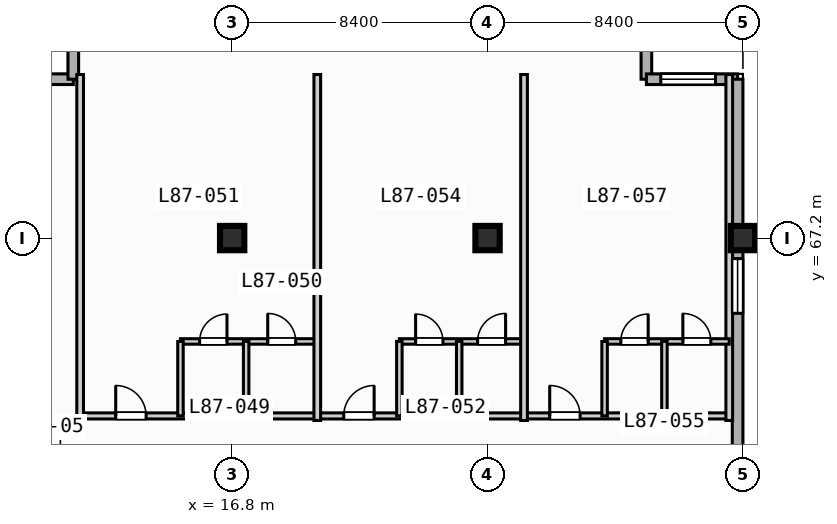
"""IFC4 building model, lengths in metres.
Left out: names, types, materials, properties, quantities, classifications, styles, units other than length and angle.
Written with IfcOpenShell. Run it as: python <this file> out.ifc"""

import sys

from ifc_helpers import new_model, si_unit, direction, frame, frame_2d, origin, origin_2d, place, context, subcontext, project, spatial, rectangle, extrude, element, fill, save


model = new_model("IFC4")
c1 = context("Model", 3, precision=1e-05, world=origin(), true_north=direction((0.0, 1.0)))
c2 = subcontext(c1, "Body", "Model", "MODEL_VIEW")
j1 = project(units=[si_unit("LENGTHUNIT", "METRE"), si_unit("PLANEANGLEUNIT", "RADIAN")], contexts=[c1])
p1 = place(None, origin())
s1 = spatial("IfcSite", under=j1, at=p1, CompositionType="ELEMENT")
p2 = place(p1, origin())
s2 = spatial("IfcBuilding", under=s1, at=p2, CompositionType="ELEMENT")
p3 = place(p2, frame((0.0, 0.0, 351.5)))
s3 = spatial("IfcBuildingStorey", under=s2, at=p3, CompositionType="ELEMENT", Elevation=351.5)
for number, where, z_axis, x_axis in (
    (1, (16.8, 67.2, 0.0), (0.0, 0.0, 1.0), (1.0, 0.0, 0.0)),
    (2, (25.2, 67.2, 0.0), (0.0, 0.0, 1.0), (1.0, 0.0, 0.0)),
    (3, (33.6, 67.2, 0.0), (0.0, 0.0, 1.0), (1.0, 0.0, 0.0)),
):
    element("IfcColumn", number, at=place(p3, frame(where, z_axis=z_axis, x_axis=x_axis)), inside=s3, PredefinedType="COLUMN", context=c2, shape_type="SweptSolid", body=[
        extrude(rectangle(XDim=0.8, YDim=0.8, at=origin_2d()), origin(), (0.0, 0.0, 1.0), 3.9),
    ])
for number, where, z_axis, x_axis in (
    (4, (8.575, 72.425, 0.0), (0.0, 0.0, 1.0), (1.0, 0.0, 0.0)),
    (5, (11.575, 72.425, 0.0), (0.0, 0.0, 1.0), (0.0, 1.0, 0.0)),
    (6, (30.425, 75.425, 0.0), (0.0, 0.0, 1.0), (0.0, -1.0, 0.0)),
):
    element("IfcWall", number, at=place(p3, frame(where, z_axis=z_axis, x_axis=x_axis)), inside=s3, PredefinedType="STANDARD", context=c2, shape_type="SweptSolid", body=[
        extrude(rectangle(XDim=3.0, YDim=0.35, at=frame_2d((1.5, 0.0))), origin(), (0.0, 0.0, 1.0), 3.67),
    ])
p4 = place(p3, frame((30.425, 72.425, 0.0), z_axis=(0.0, 0.0, 1.0), x_axis=(1.0, 0.0, 0.0)))
e7 = element("IfcWall", 7, at=p4, inside=s3, PredefinedType="STANDARD", context=c2, shape_type="SweptSolid", body=[
    extrude(rectangle(XDim=3.0, YDim=0.35, at=frame_2d((1.5, 0.0))), origin(), (0.0, 0.0, 1.0), 3.67),
])
p5 = place(p4, frame((0.472, 0.0, 0.85)))
e8 = element("IfcOpeningElement", 8, at=p5, cuts=e7, PredefinedType="OPENING", context=c2, shape_type="SweptSolid", body=[
    extrude(rectangle(XDim=1.8, YDim=1.8, at=frame_2d((0.9, 0.9))), frame((0.0, 0.185, 0.0), z_axis=(0.0, -1.0, 0.0), x_axis=(1.0, 0.0, 0.0)), (0.0, 0.0, 1.0), 0.37),
])
p6 = place(p3, frame((33.425, 72.425, 0.0), z_axis=(0.0, 0.0, 1.0), x_axis=(0.0, -1.0, 0.0)))
e9 = element("IfcWall", 9, at=p6, inside=s3, PredefinedType="STANDARD", context=c2, shape_type="SweptSolid", body=[
    extrude(rectangle(XDim=39.0, YDim=0.35, at=frame_2d((19.5, 0.0))), origin(), (0.0, 0.0, 1.0), 3.67),
])
p7 = place(p6, frame((5.9, 0.0, 0.85)))
e10 = element("IfcOpeningElement", 10, at=p7, cuts=e9, PredefinedType="OPENING", context=c2, shape_type="SweptSolid", body=[
    extrude(rectangle(XDim=1.8, YDim=1.8, at=frame_2d((0.9, 0.9))), frame((0.0, 0.185, 0.0), z_axis=(0.0, -1.0, 0.0), x_axis=(1.0, 0.0, 0.0)), (0.0, 0.0, 1.0), 0.37),
])
p8 = place(p3, frame((11.8, 61.35, 0.0), z_axis=(0.0, 0.0, 1.0), x_axis=(1.0, 0.0, 0.0)))
e11 = element("IfcWall", 11, at=p8, inside=s3, PredefinedType="PARTITIONING", context=c2, shape_type="SweptSolid", body=[
    extrude(rectangle(XDim=21.35, YDim=0.2, at=frame_2d((10.675, 0.0))), origin(), (0.0, 0.0, 1.0), 3.67),
])
p9 = place(p8, frame((1.17, 0.0, 0.0)))
e12 = element("IfcOpeningElement", 12, at=p9, cuts=e11, PredefinedType="OPENING", context=c2, shape_type="SweptSolid", body=[
    extrude(rectangle(XDim=1.0, YDim=2.15, at=frame_2d((0.5, 1.075))), frame((0.0, 0.11, 0.0), z_axis=(0.0, -1.0, 0.0), x_axis=(1.0, 0.0, 0.0)), (0.0, 0.0, 1.0), 0.22),
])
p10 = place(p8, frame((8.67, 0.0, 0.0)))
e13 = element("IfcOpeningElement", 13, at=p10, cuts=e11, PredefinedType="OPENING", context=c2, shape_type="SweptSolid", body=[
    extrude(rectangle(XDim=1.0, YDim=2.15, at=frame_2d((0.5, 1.075))), frame((0.0, 0.11, 0.0), z_axis=(0.0, -1.0, 0.0), x_axis=(1.0, 0.0, 0.0)), (0.0, 0.0, 1.0), 0.22),
])
p11 = place(p8, frame((15.445, 0.0, 0.0)))
e14 = element("IfcOpeningElement", 14, at=p11, cuts=e11, PredefinedType="OPENING", context=c2, shape_type="SweptSolid", body=[
    extrude(rectangle(XDim=1.0, YDim=2.15, at=frame_2d((0.5, 1.075))), frame((0.0, 0.11, 0.0), z_axis=(0.0, -1.0, 0.0), x_axis=(1.0, 0.0, 0.0)), (0.0, 0.0, 1.0), 0.22),
])
p12 = place(p3, frame((11.8, 61.2, 0.0), z_axis=(0.0, 0.0, 1.0), x_axis=(0.0, 1.0, 0.0)))
e15 = element("IfcWall", 15, at=p12, inside=s3, PredefinedType="PARTITIONING", context=c2, shape_type="SweptSolid", body=[
    extrude(rectangle(XDim=11.38, YDim=0.22, at=frame_2d((5.69, 0.0))), origin(), (0.0, 0.0, 1.0), 3.67),
])
p13 = place(p3, frame((15.1, 63.8, 0.0), z_axis=(0.0, 0.0, 1.0), x_axis=(1.0, 0.0, 0.0)))
e16 = element("IfcWall", 16, at=p13, inside=s3, PredefinedType="PLUMBINGWALL", context=c2, shape_type="SweptSolid", body=[
    extrude(rectangle(XDim=4.5, YDim=0.18, at=frame_2d((2.25, 0.0))), origin(), (0.0, 0.0, 1.0), 3.67),
])
p14 = place(p13, frame((0.63, 0.0, 0.0)))
e17 = element("IfcOpeningElement", 17, at=p14, cuts=e16, PredefinedType="OPENING", context=c2, shape_type="SweptSolid", body=[
    extrude(rectangle(XDim=0.9, YDim=2.1, at=frame_2d((0.45, 1.05))), frame((0.0, 0.1, 0.0), z_axis=(0.0, -1.0, 0.0), x_axis=(1.0, 0.0, 0.0)), (0.0, 0.0, 1.0), 0.2),
])
p15 = place(p13, frame((2.87, 0.0, 0.0)))
e18 = element("IfcOpeningElement", 18, at=p15, cuts=e16, PredefinedType="OPENING", context=c2, shape_type="SweptSolid", body=[
    extrude(rectangle(XDim=0.92, YDim=2.1, at=frame_2d((0.46, 1.05))), frame((0.0, 0.1, 0.0), z_axis=(0.0, -1.0, 0.0), x_axis=(1.0, 0.0, 0.0)), (0.0, 0.0, 1.0), 0.2),
])
for number, where, z_axis, x_axis in (
    (19, (15.1, 61.35, 0.0), (0.0, 0.0, 1.0), (0.0, 1.0, 0.0)),
    (20, (17.26, 61.35, 0.0), (0.0, 0.0, 1.0), (0.0, 1.0, 0.0)),
):
    element("IfcWall", number, at=place(p3, frame(where, z_axis=z_axis, x_axis=x_axis)), inside=s3, PredefinedType="PLUMBINGWALL", context=c2, shape_type="SweptSolid", body=[
        extrude(rectangle(XDim=2.45, YDim=0.18, at=frame_2d((1.225, 0.0))), origin(), (0.0, 0.0, 1.0), 3.67),
    ])
p16 = place(p3, frame((19.6, 61.2, 0.0), z_axis=(0.0, 0.0, 1.0), x_axis=(0.0, 1.0, 0.0)))
e21 = element("IfcWall", 21, at=p16, inside=s3, PredefinedType="PARTITIONING", context=c2, shape_type="SweptSolid", body=[
    extrude(rectangle(XDim=11.38, YDim=0.22, at=frame_2d((5.69, 0.0))), origin(), (0.0, 0.0, 1.0), 3.67),
])
p17 = place(p3, frame((22.3, 63.8, 0.0), z_axis=(0.0, 0.0, 1.0), x_axis=(1.0, 0.0, 0.0)))
e22 = element("IfcWall", 22, at=p17, inside=s3, PredefinedType="PLUMBINGWALL", context=c2, shape_type="SweptSolid", body=[
    extrude(rectangle(XDim=4.1, YDim=0.18, at=frame_2d((2.05, 0.0))), origin(), (0.0, 0.0, 1.0), 3.67),
])
p18 = place(p17, frame((0.534, 0.0, 0.0)))
e23 = element("IfcOpeningElement", 23, at=p18, cuts=e22, PredefinedType="OPENING", context=c2, shape_type="SweptSolid", body=[
    extrude(rectangle(XDim=0.9, YDim=2.1, at=frame_2d((0.45, 1.05))), frame((0.0, 0.1, 0.0), z_axis=(0.0, -1.0, 0.0), x_axis=(1.0, 0.0, 0.0)), (0.0, 0.0, 1.0), 0.2),
])
p19 = place(p17, frame((2.574, 0.0, 0.0)))
e24 = element("IfcOpeningElement", 24, at=p19, cuts=e22, PredefinedType="OPENING", context=c2, shape_type="SweptSolid", body=[
    extrude(rectangle(XDim=0.92, YDim=2.1, at=frame_2d((0.46, 1.05))), frame((0.0, 0.1, 0.0), z_axis=(0.0, -1.0, 0.0), x_axis=(1.0, 0.0, 0.0)), (0.0, 0.0, 1.0), 0.2),
])
for number, where, z_axis, x_axis in (
    (25, (22.3, 61.35, 0.0), (0.0, 0.0, 1.0), (0.0, 1.0, 0.0)),
    (26, (24.268, 61.35, 0.0), (0.0, 0.0, 1.0), (0.0, 1.0, 0.0)),
):
    element("IfcWall", number, at=place(p3, frame(where, z_axis=z_axis, x_axis=x_axis)), inside=s3, PredefinedType="PLUMBINGWALL", context=c2, shape_type="SweptSolid", body=[
        extrude(rectangle(XDim=2.45, YDim=0.18, at=frame_2d((1.225, 0.0))), origin(), (0.0, 0.0, 1.0), 3.67),
    ])
for number, where, z_axis, x_axis in (
    (27, (26.4, 61.2, 0.0), (0.0, 0.0, 1.0), (0.0, 1.0, 0.0)),
    (28, (33.15, 61.2, 0.0), (0.0, 0.0, 1.0), (0.0, 1.0, 0.0)),
):
    element("IfcWall", number, at=place(p3, frame(where, z_axis=z_axis, x_axis=x_axis)), inside=s3, PredefinedType="PARTITIONING", context=c2, shape_type="SweptSolid", body=[
        extrude(rectangle(XDim=11.38, YDim=0.22, at=frame_2d((5.69, 0.0))), origin(), (0.0, 0.0, 1.0), 3.67),
    ])
p20 = place(p3, frame((29.05, 63.8, 0.0), z_axis=(0.0, 0.0, 1.0), x_axis=(1.0, 0.0, 0.0)))
e29 = element("IfcWall", 29, at=p20, inside=s3, PredefinedType="PLUMBINGWALL", context=c2, shape_type="SweptSolid", body=[
    extrude(rectangle(XDim=4.1, YDim=0.18, at=frame_2d((2.05, 0.0))), origin(), (0.0, 0.0, 1.0), 3.67),
])
p21 = place(p20, frame((0.534, 0.0, 0.0)))
e30 = element("IfcOpeningElement", 30, at=p21, cuts=e29, PredefinedType="OPENING", context=c2, shape_type="SweptSolid", body=[
    extrude(rectangle(XDim=0.9, YDim=2.1, at=frame_2d((0.45, 1.05))), frame((0.0, 0.1, 0.0), z_axis=(0.0, -1.0, 0.0), x_axis=(1.0, 0.0, 0.0)), (0.0, 0.0, 1.0), 0.2),
])
p22 = place(p20, frame((2.574, 0.0, 0.0)))
e31 = element("IfcOpeningElement", 31, at=p22, cuts=e29, PredefinedType="OPENING", context=c2, shape_type="SweptSolid", body=[
    extrude(rectangle(XDim=0.92, YDim=2.1, at=frame_2d((0.46, 1.05))), frame((0.0, 0.1, 0.0), z_axis=(0.0, -1.0, 0.0), x_axis=(1.0, 0.0, 0.0)), (0.0, 0.0, 1.0), 0.2),
])
for number, where, z_axis, x_axis in (
    (32, (29.05, 61.35, 0.0), (0.0, 0.0, 1.0), (0.0, 1.0, 0.0)),
    (33, (31.018, 61.35, 0.0), (0.0, 0.0, 1.0), (0.0, 1.0, 0.0)),
):
    element("IfcWall", number, at=place(p3, frame(where, z_axis=z_axis, x_axis=x_axis)), inside=s3, PredefinedType="PLUMBINGWALL", context=c2, shape_type="SweptSolid", body=[
        extrude(rectangle(XDim=2.45, YDim=0.18, at=frame_2d((1.225, 0.0))), origin(), (0.0, 0.0, 1.0), 3.67),
    ])
p23 = place(p5, origin())
e34 = element("IfcWindow", 34, at=p23, inside=s3, PartitioningType="SINGLE_PANEL", PredefinedType="WINDOW", context=c2, shape_type="SweptSolid", body=[
    extrude(rectangle(XDim=1.8, YDim=1.8, at=frame_2d((0.9, 0.9))), frame((0.0, 0.03, 0.0), z_axis=(0.0, -1.0, 0.0), x_axis=(1.0, 0.0, 0.0)), (0.0, 0.0, 1.0), 0.06),
])
fill(e8, e34)
p24 = place(p7, origin())
e35 = element("IfcWindow", 35, at=p24, inside=s3, PartitioningType="SINGLE_PANEL", PredefinedType="WINDOW", context=c2, shape_type="SweptSolid", body=[
    extrude(rectangle(XDim=1.8, YDim=1.8, at=frame_2d((0.9, 0.9))), frame((0.0, 0.03, 0.0), z_axis=(0.0, -1.0, 0.0), x_axis=(1.0, 0.0, 0.0)), (0.0, 0.0, 1.0), 0.06),
])
fill(e10, e35)
p25 = place(p9, origin())
e36 = element("IfcDoor", 36, at=p25, inside=s3, OperationType="SINGLE_SWING_LEFT", PredefinedType="DOOR", context=c2, shape_type="SweptSolid", body=[
    extrude(rectangle(XDim=1.0, YDim=2.15, at=frame_2d((0.5, 1.075))), frame((0.0, 0.025, 0.0), z_axis=(0.0, -1.0, 0.0), x_axis=(1.0, 0.0, 0.0)), (0.0, 0.0, 1.0), 0.05),
])
fill(e12, e36)
p26 = place(p10, origin())
e37 = element("IfcDoor", 37, at=p26, inside=s3, OperationType="SINGLE_SWING_RIGHT", PredefinedType="DOOR", context=c2, shape_type="SweptSolid", body=[
    extrude(rectangle(XDim=1.0, YDim=2.15, at=frame_2d((0.5, 1.075))), frame((0.0, 0.025, 0.0), z_axis=(0.0, -1.0, 0.0), x_axis=(1.0, 0.0, 0.0)), (0.0, 0.0, 1.0), 0.05),
])
fill(e13, e37)
p27 = place(p11, origin())
e38 = element("IfcDoor", 38, at=p27, inside=s3, OperationType="SINGLE_SWING_LEFT", PredefinedType="DOOR", context=c2, shape_type="SweptSolid", body=[
    extrude(rectangle(XDim=1.0, YDim=2.15, at=frame_2d((0.5, 1.075))), frame((0.0, 0.025, 0.0), z_axis=(0.0, -1.0, 0.0), x_axis=(1.0, 0.0, 0.0)), (0.0, 0.0, 1.0), 0.05),
])
fill(e14, e38)
p28 = place(p14, origin())
e39 = element("IfcDoor", 39, at=p28, inside=s3, OperationType="SINGLE_SWING_RIGHT", PredefinedType="DOOR", context=c2, shape_type="SweptSolid", body=[
    extrude(rectangle(XDim=0.9, YDim=2.1, at=frame_2d((0.45, 1.05))), frame((0.0, 0.025, 0.0), z_axis=(0.0, -1.0, 0.0), x_axis=(1.0, 0.0, 0.0)), (0.0, 0.0, 1.0), 0.05),
])
fill(e17, e39)
p29 = place(p15, origin())
e40 = element("IfcDoor", 40, at=p29, inside=s3, OperationType="SINGLE_SWING_LEFT", PredefinedType="DOOR", context=c2, shape_type="SweptSolid", body=[
    extrude(rectangle(XDim=0.92, YDim=2.1, at=frame_2d((0.46, 1.05))), frame((0.0, 0.025, 0.0), z_axis=(0.0, -1.0, 0.0), x_axis=(1.0, 0.0, 0.0)), (0.0, 0.0, 1.0), 0.05),
])
fill(e18, e40)
p30 = place(p18, origin())
e41 = element("IfcDoor", 41, at=p30, inside=s3, OperationType="SINGLE_SWING_LEFT", PredefinedType="DOOR", context=c2, shape_type="SweptSolid", body=[
    extrude(rectangle(XDim=0.9, YDim=2.1, at=frame_2d((0.45, 1.05))), frame((0.0, 0.025, 0.0), z_axis=(0.0, -1.0, 0.0), x_axis=(1.0, 0.0, 0.0)), (0.0, 0.0, 1.0), 0.05),
])
fill(e23, e41)
p31 = place(p19, origin())
e42 = element("IfcDoor", 42, at=p31, inside=s3, OperationType="SINGLE_SWING_RIGHT", PredefinedType="DOOR", context=c2, shape_type="SweptSolid", body=[
    extrude(rectangle(XDim=0.92, YDim=2.1, at=frame_2d((0.46, 1.05))), frame((0.0, 0.025, 0.0), z_axis=(0.0, -1.0, 0.0), x_axis=(1.0, 0.0, 0.0)), (0.0, 0.0, 1.0), 0.05),
])
fill(e24, e42)
p32 = place(p21, origin())
e43 = element("IfcDoor", 43, at=p32, inside=s3, OperationType="SINGLE_SWING_RIGHT", PredefinedType="DOOR", context=c2, shape_type="SweptSolid", body=[
    extrude(rectangle(XDim=0.9, YDim=2.1, at=frame_2d((0.45, 1.05))), frame((0.0, 0.025, 0.0), z_axis=(0.0, -1.0, 0.0), x_axis=(1.0, 0.0, 0.0)), (0.0, 0.0, 1.0), 0.05),
])
fill(e30, e43)
p33 = place(p22, origin())
e44 = element("IfcDoor", 44, at=p33, inside=s3, OperationType="SINGLE_SWING_LEFT", PredefinedType="DOOR", context=c2, shape_type="SweptSolid", body=[
    extrude(rectangle(XDim=0.92, YDim=2.1, at=frame_2d((0.46, 1.05))), frame((0.0, 0.025, 0.0), z_axis=(0.0, -1.0, 0.0), x_axis=(1.0, 0.0, 0.0)), (0.0, 0.0, 1.0), 0.05),
])
fill(e31, e44)
save(model, sys.argv[1])
